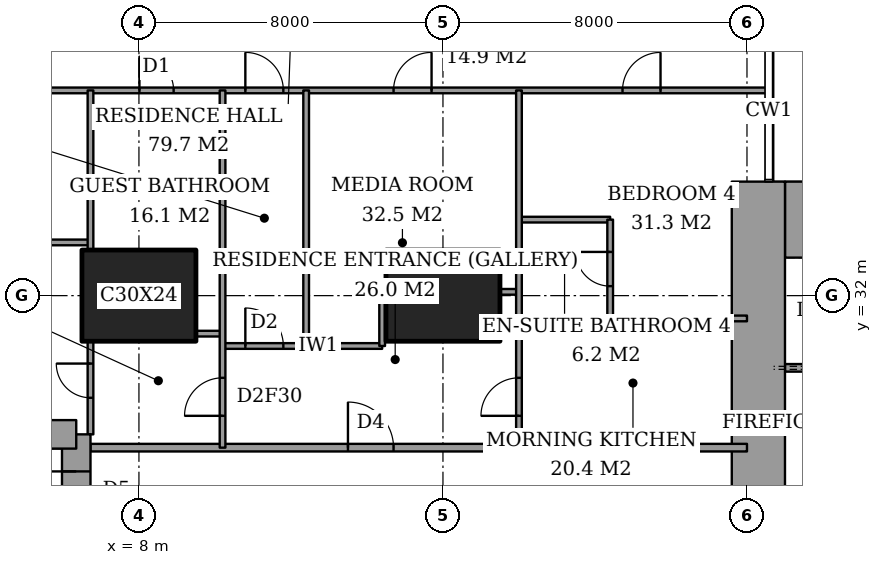
"""IFC4 building model, lengths in metres.
Left out: names, types, materials, properties, quantities, classifications, styles, units other than length and angle.
Written with IfcOpenShell. Run it as: python <this file> out.ifc"""

import sys

from ifc_helpers import new_model, si_unit, direction, frame, frame_2d, origin, origin_2d, place, context, subcontext, project, spatial, rectangle, extrude, element, fill, save


model = new_model("IFC4")
c1 = context("Model", 3, precision=1e-05, world=origin(), true_north=direction((0.0, 1.0)))
c2 = subcontext(c1, "Body", "Model", "MODEL_VIEW")
j1 = project(units=[si_unit("LENGTHUNIT", "METRE"), si_unit("PLANEANGLEUNIT", "RADIAN")], contexts=[c1])
p1 = place(None, origin())
s1 = spatial("IfcSite", under=j1, at=p1, CompositionType="ELEMENT")
p2 = place(p1, origin())
s2 = spatial("IfcBuilding", under=s1, at=p2, CompositionType="ELEMENT")
p3 = place(p2, frame((0.0, 0.0, 214.6)))
s3 = spatial("IfcBuildingStorey", under=s2, at=p3, CompositionType="ELEMENT", Elevation=214.6)
for number, where, z_axis, x_axis in (
    (1, (8.0, 32.0, 0.0), (0.0, 0.0, 1.0), (1.0, 0.0, 0.0)),
    (2, (16.0, 32.0, 0.0), (0.0, 0.0, 1.0), (1.0, 0.0, 0.0)),
):
    element("IfcColumn", number, at=place(p3, frame(where, z_axis=z_axis, x_axis=x_axis)), inside=s3, PredefinedType="COLUMN", context=c2, shape_type="SweptSolid", body=[
        extrude(rectangle(XDim=3.0, YDim=2.4, at=origin_2d()), origin(), (0.0, 0.0, 1.0), 3.6),
    ])
p4 = place(p3, frame((25.0, 34.0, 0.0), z_axis=(0.0, 0.0, 1.0), x_axis=(1.0, 0.0, 0.0)))
e3 = element("IfcWall", 3, at=p4, inside=s3, PredefinedType="SHEAR", context=c2, shape_type="SweptSolid", body=[
    extrude(rectangle(XDim=3.15, YDim=2.0, at=frame_2d((1.575, 0.0))), origin(), (0.0, 0.0, 1.0), 3.6),
])
p5 = place(p3, frame((24.3, 23.15, 0.0), z_axis=(0.0, 0.0, 1.0), x_axis=(0.0, 1.0, 0.0)))
e4 = element("IfcWall", 4, at=p5, inside=s3, PredefinedType="SHEAR", context=c2, shape_type="SweptSolid", body=[
    extrude(rectangle(XDim=11.85, YDim=1.4, at=frame_2d((5.925, 0.0))), origin(), (0.0, 0.0, 1.0), 3.6),
])
p6 = place(p5, frame((0.75, 0.0, 0.0)))
e5 = element("IfcOpeningElement", 5, at=p6, cuts=e4, PredefinedType="OPENING", context=c2, shape_type="SweptSolid", body=[
    extrude(rectangle(XDim=1.8, YDim=2.4, at=frame_2d((0.9, 1.2))), frame((0.0, 0.71, 0.0), z_axis=(0.0, -1.0, 0.0), x_axis=(1.0, 0.0, 0.0)), (0.0, 0.0, 1.0), 1.42),
])
p7 = place(p3, frame((6.35, 19.65, 0.0), z_axis=(0.0, 0.0, 1.0), x_axis=(0.0, 1.0, 0.0)))
e6 = element("IfcWall", 6, at=p7, inside=s3, PredefinedType="SHEAR", context=c2, shape_type="SweptSolid", body=[
    extrude(rectangle(XDim=8.7, YDim=0.75, at=frame_2d((4.35, 0.0))), origin(), (0.0, 0.0, 1.0), 3.6),
])
p8 = place(p7, frame((6.725, 0.0, 0.0)))
e7 = element("IfcOpeningElement", 7, at=p8, cuts=e6, PredefinedType="OPENING", context=c2, shape_type="SweptSolid", body=[
    extrude(rectangle(XDim=1.0, YDim=2.1, at=frame_2d((0.5, 1.05))), frame((0.0, 0.385, 0.0), z_axis=(0.0, -1.0, 0.0), x_axis=(1.0, 0.0, 0.0)), (0.0, 0.0, 1.0), 0.77),
])
p9 = place(p3, frame((6.35, 28.35, 0.0), z_axis=(0.0, 0.0, 1.0), x_axis=(-1.0, 0.0, 0.0)))
e8 = element("IfcWall", 8, at=p9, inside=s3, PredefinedType="SHEAR", context=c2, shape_type="SweptSolid", body=[
    extrude(rectangle(XDim=4.45, YDim=0.75, at=frame_2d((2.225, 0.0))), origin(), (0.0, 0.0, 1.0), 3.6),
])
p10 = place(p3, frame((6.725, 28.0, 0.0), z_axis=(0.0, 0.0, 1.0), x_axis=(1.0, 0.0, 0.0)))
e9 = element("IfcWall", 9, at=p10, inside=s3, PredefinedType="PARTITIONING", context=c2, shape_type="SweptSolid", body=[
    extrude(rectangle(XDim=17.275, YDim=0.2, at=frame_2d((8.637, 0.0))), origin(), (0.0, 0.0, 1.0), 3.35),
])
p11 = place(p10, frame((6.775, 0.0, 0.0)))
e10 = element("IfcOpeningElement", 10, at=p11, cuts=e9, PredefinedType="OPENING", context=c2, shape_type="SweptSolid", body=[
    extrude(rectangle(XDim=1.2, YDim=2.4, at=frame_2d((0.6, 1.2))), frame((0.0, 0.11, 0.0), z_axis=(0.0, -1.0, 0.0), x_axis=(1.0, 0.0, 0.0)), (0.0, 0.0, 1.0), 0.22),
])
p12 = place(p3, frame((10.2, 30.675, 0.0), z_axis=(0.0, 0.0, 1.0), x_axis=(1.0, 0.0, 0.0)))
e11 = element("IfcWall", 11, at=p12, inside=s3, PredefinedType="PARTITIONING", context=c2, shape_type="SweptSolid", body=[
    extrude(rectangle(XDim=4.2, YDim=0.15, at=frame_2d((2.1, 0.0))), origin(), (0.0, 0.0, 1.0), 3.35),
])
p13 = place(p12, frame((0.6, 0.0, 0.0)))
e12 = element("IfcOpeningElement", 12, at=p13, cuts=e11, PredefinedType="OPENING", context=c2, shape_type="SweptSolid", body=[
    extrude(rectangle(XDim=1.0, YDim=2.1, at=frame_2d((0.5, 1.05))), frame((0.0, 0.085, 0.0), z_axis=(0.0, -1.0, 0.0), x_axis=(1.0, 0.0, 0.0)), (0.0, 0.0, 1.0), 0.17),
])
p14 = place(p3, frame((9.5, 31.0, 0.0), z_axis=(0.0, 0.0, 1.0), x_axis=(1.0, 0.0, 0.0)))
e13 = element("IfcWall", 13, at=p14, inside=s3, PredefinedType="PARTITIONING", context=c2, shape_type="SweptSolid", body=[
    extrude(rectangle(XDim=0.7, YDim=0.15, at=frame_2d((0.35, 0.0))), origin(), (0.0, 0.0, 1.0), 3.35),
])
p15 = place(p3, frame((18.0, 31.4, 0.0), z_axis=(0.0, 0.0, 1.0), x_axis=(1.0, 0.0, 0.0)))
e14 = element("IfcWall", 14, at=p15, inside=s3, PredefinedType="PARTITIONING", context=c2, shape_type="SweptSolid", body=[
    extrude(rectangle(XDim=6.0, YDim=0.15, at=frame_2d((3.0, 0.0))), origin(), (0.0, 0.0, 1.0), 3.35),
])
p16 = place(p3, frame((17.5, 32.1, 0.0), z_axis=(0.0, 0.0, 1.0), x_axis=(1.0, 0.0, 0.0)))
e15 = element("IfcWall", 15, at=p16, inside=s3, PredefinedType="PARTITIONING", context=c2, shape_type="SweptSolid", body=[
    extrude(rectangle(XDim=0.5, YDim=0.15, at=frame_2d((0.25, 0.0))), origin(), (0.0, 0.0, 1.0), 2.634),
])
p17 = place(p3, frame((-0.45, 33.4, 0.0), z_axis=(0.0, 0.0, 1.0), x_axis=(1.0, 0.0, 0.0)))
e16 = element("IfcWall", 16, at=p17, inside=s3, PredefinedType="PARTITIONING", context=c2, shape_type="SweptSolid", body=[
    extrude(rectangle(XDim=7.175, YDim=0.15, at=frame_2d((3.587, 0.0))), origin(), (0.0, 0.0, 1.0), 3.35),
])
p18 = place(p3, frame((18.0, 34.0, 0.0), z_axis=(0.0, 0.0, 1.0), x_axis=(1.0, 0.0, 0.0)))
e17 = element("IfcWall", 17, at=p18, inside=s3, PredefinedType="PARTITIONING", context=c2, shape_type="SweptSolid", body=[
    extrude(rectangle(XDim=2.4, YDim=0.15, at=frame_2d((1.2, 0.0))), origin(), (0.0, 0.0, 1.0), 3.35),
])
p19 = place(p3, frame((-0.45, 37.4, 0.0), z_axis=(0.0, 0.0, 1.0), x_axis=(1.0, 0.0, 0.0)))
e18 = element("IfcWall", 18, at=p19, inside=s3, PredefinedType="PARTITIONING", context=c2, shape_type="SweptSolid", body=[
    extrude(rectangle(XDim=25.011, YDim=0.15, at=frame_2d((12.505, 0.0))), origin(), (0.0, 0.0, 1.0), 3.35),
])
p20 = place(p19, frame((11.25, 0.0, 0.0)))
e19 = element("IfcOpeningElement", 19, at=p20, cuts=e18, PredefinedType="OPENING", context=c2, shape_type="SweptSolid", body=[
    extrude(rectangle(XDim=1.0, YDim=2.1, at=frame_2d((0.5, 1.05))), frame((0.0, 0.085, 0.0), z_axis=(0.0, -1.0, 0.0), x_axis=(1.0, 0.0, 0.0)), (0.0, 0.0, 1.0), 0.17),
])
p21 = place(p19, frame((3.087, 0.0, 0.0)))
e20 = element("IfcOpeningElement", 20, at=p21, cuts=e18, PredefinedType="OPENING", context=c2, shape_type="SweptSolid", body=[
    extrude(rectangle(XDim=1.0, YDim=2.1, at=frame_2d((0.5, 1.05))), frame((0.0, 0.085, 0.0), z_axis=(0.0, -1.0, 0.0), x_axis=(1.0, 0.0, 0.0)), (0.0, 0.0, 1.0), 0.17),
])
p22 = place(p19, frame((8.462, 0.0, 0.0)))
e21 = element("IfcOpeningElement", 21, at=p22, cuts=e18, PredefinedType="OPENING", context=c2, shape_type="SweptSolid", body=[
    extrude(rectangle(XDim=0.9, YDim=2.1, at=frame_2d((0.45, 1.05))), frame((0.0, 0.085, 0.0), z_axis=(0.0, -1.0, 0.0), x_axis=(1.0, 0.0, 0.0)), (0.0, 0.0, 1.0), 0.17),
])
p23 = place(p19, frame((15.15, 0.0, 0.0)))
e22 = element("IfcOpeningElement", 22, at=p23, cuts=e18, PredefinedType="OPENING", context=c2, shape_type="SweptSolid", body=[
    extrude(rectangle(XDim=1.0, YDim=2.1, at=frame_2d((0.5, 1.05))), frame((0.0, 0.085, 0.0), z_axis=(0.0, -1.0, 0.0), x_axis=(1.0, 0.0, 0.0)), (0.0, 0.0, 1.0), 0.17),
])
p24 = place(p19, frame((21.175, 0.0, 0.0)))
e23 = element("IfcOpeningElement", 23, at=p24, cuts=e18, PredefinedType="OPENING", context=c2, shape_type="SweptSolid", body=[
    extrude(rectangle(XDim=1.0, YDim=2.1, at=frame_2d((0.5, 1.05))), frame((0.0, 0.085, 0.0), z_axis=(0.0, -1.0, 0.0), x_axis=(1.0, 0.0, 0.0)), (0.0, 0.0, 1.0), 0.17),
])
p25 = place(p3, frame((6.725, 28.35, 0.0), z_axis=(0.0, 0.0, 1.0), x_axis=(0.0, 1.0, 0.0)))
e24 = element("IfcWall", 24, at=p25, inside=s3, PredefinedType="PARTITIONING", context=c2, shape_type="SweptSolid", body=[
    extrude(rectangle(XDim=2.45, YDim=0.15, at=frame_2d((1.225, 0.0))), origin(), (0.0, 0.0, 1.0), 3.35),
])
p26 = place(p25, frame((0.962, 0.0, 0.0)))
e25 = element("IfcOpeningElement", 25, at=p26, cuts=e24, PredefinedType="OPENING", context=c2, shape_type="SweptSolid", body=[
    extrude(rectangle(XDim=0.9, YDim=2.1, at=frame_2d((0.45, 1.05))), frame((0.0, 0.085, 0.0), z_axis=(0.0, -1.0, 0.0), x_axis=(1.0, 0.0, 0.0)), (0.0, 0.0, 1.0), 0.17),
])
p27 = place(p3, frame((6.725, 33.2, 0.0), z_axis=(0.0, 0.0, 1.0), x_axis=(0.0, 1.0, 0.0)))
e26 = element("IfcWall", 26, at=p27, inside=s3, PredefinedType="PARTITIONING", context=c2, shape_type="SweptSolid", body=[
    extrude(rectangle(XDim=4.2, YDim=0.15, at=frame_2d((2.1, 0.0))), origin(), (0.0, 0.0, 1.0), 3.35),
])
p28 = place(p3, frame((10.2, 28.0, 0.0), z_axis=(0.0, 0.0, 1.0), x_axis=(0.0, 1.0, 0.0)))
e27 = element("IfcWall", 27, at=p28, inside=s3, PredefinedType="PARTITIONING", context=c2, shape_type="SweptSolid", body=[
    extrude(rectangle(XDim=9.4, YDim=0.15, at=frame_2d((4.7, 0.0))), origin(), (0.0, 0.0, 1.0), 3.35),
])
p29 = place(p28, frame((0.837, 0.0, 0.0)))
e28 = element("IfcOpeningElement", 28, at=p29, cuts=e27, PredefinedType="OPENING", context=c2, shape_type="SweptSolid", body=[
    extrude(rectangle(XDim=1.0, YDim=2.1, at=frame_2d((0.5, 1.05))), frame((0.0, 0.085, 0.0), z_axis=(0.0, -1.0, 0.0), x_axis=(1.0, 0.0, 0.0)), (0.0, 0.0, 1.0), 0.17),
])
p30 = place(p3, frame((12.4, 30.675, 0.0), z_axis=(0.0, 0.0, 1.0), x_axis=(0.0, 1.0, 0.0)))
e29 = element("IfcWall", 29, at=p30, inside=s3, PredefinedType="PARTITIONING", context=c2, shape_type="SweptSolid", body=[
    extrude(rectangle(XDim=6.725, YDim=0.15, at=frame_2d((3.362, 0.0))), origin(), (0.0, 0.0, 1.0), 3.35),
])
p31 = place(p3, frame((14.4, 30.675, 0.0), z_axis=(0.0, 0.0, 1.0), x_axis=(0.0, 1.0, 0.0)))
e30 = element("IfcWall", 30, at=p31, inside=s3, PredefinedType="PARTITIONING", context=c2, shape_type="SweptSolid", body=[
    extrude(rectangle(XDim=1.425, YDim=0.15, at=frame_2d((0.712, 0.0))), origin(), (0.0, 0.0, 1.0), 3.35),
])
p32 = place(p3, frame((18.0, 28.0, 0.0), z_axis=(0.0, 0.0, 1.0), x_axis=(0.0, 1.0, 0.0)))
e31 = element("IfcWall", 31, at=p32, inside=s3, PredefinedType="PARTITIONING", context=c2, shape_type="SweptSolid", body=[
    extrude(rectangle(XDim=9.4, YDim=0.15, at=frame_2d((4.7, 0.0))), origin(), (0.0, 0.0, 1.0), 3.35),
])
p33 = place(p32, frame((0.837, 0.0, 0.0)))
e32 = element("IfcOpeningElement", 32, at=p33, cuts=e31, PredefinedType="OPENING", context=c2, shape_type="SweptSolid", body=[
    extrude(rectangle(XDim=1.0, YDim=2.1, at=frame_2d((0.5, 1.05))), frame((0.0, 0.085, 0.0), z_axis=(0.0, -1.0, 0.0), x_axis=(1.0, 0.0, 0.0)), (0.0, 0.0, 1.0), 0.17),
])
p34 = place(p3, frame((20.4, 31.4, 0.0), z_axis=(0.0, 0.0, 1.0), x_axis=(0.0, 1.0, 0.0)))
e33 = element("IfcWall", 33, at=p34, inside=s3, PredefinedType="PARTITIONING", context=c2, shape_type="SweptSolid", body=[
    extrude(rectangle(XDim=2.6, YDim=0.15, at=frame_2d((1.3, 0.0))), origin(), (0.0, 0.0, 1.0), 3.35),
])
p35 = place(p34, frame((0.85, 0.0, 0.0)))
e34 = element("IfcOpeningElement", 34, at=p35, cuts=e33, PredefinedType="OPENING", context=c2, shape_type="SweptSolid", body=[
    extrude(rectangle(XDim=0.9, YDim=2.1, at=frame_2d((0.45, 1.05))), frame((0.0, 0.085, 0.0), z_axis=(0.0, -1.0, 0.0), x_axis=(1.0, 0.0, 0.0)), (0.0, 0.0, 1.0), 0.17),
])
p36 = place(p3, frame((25.0, 30.1, 0.0), z_axis=(0.0, 0.0, 1.0), x_axis=(1.0, 0.0, 0.0)))
e35 = element("IfcWall", 35, at=p36, inside=s3, PredefinedType="PARTITIONING", context=c2, shape_type="SweptSolid", body=[
    extrude(rectangle(XDim=12.7, YDim=0.2, at=frame_2d((6.35, 0.0))), origin(), (0.0, 0.0, 1.0), 3.6),
])
p37 = place(p36, frame((4.25, 0.0, 0.0)))
e36 = element("IfcOpeningElement", 36, at=p37, cuts=e35, PredefinedType="OPENING", context=c2, shape_type="SweptSolid", body=[
    extrude(rectangle(XDim=1.1, YDim=2.1, at=frame_2d((0.55, 1.05))), frame((0.0, 0.11, 0.0), z_axis=(0.0, -1.0, 0.0), x_axis=(1.0, 0.0, 0.0)), (0.0, 0.0, 1.0), 0.22),
])
p38 = place(p36, frame((7.45, 0.0, 0.0)))
e37 = element("IfcOpeningElement", 37, at=p38, cuts=e35, PredefinedType="OPENING", context=c2, shape_type="SweptSolid", body=[
    extrude(rectangle(XDim=1.1, YDim=2.1, at=frame_2d((0.55, 1.05))), frame((0.0, 0.11, 0.0), z_axis=(0.0, -1.0, 0.0), x_axis=(1.0, 0.0, 0.0)), (0.0, 0.0, 1.0), 0.22),
])
p39 = place(p36, frame((10.65, 0.0, 0.0)))
e38 = element("IfcOpeningElement", 38, at=p39, cuts=e35, PredefinedType="OPENING", context=c2, shape_type="SweptSolid", body=[
    extrude(rectangle(XDim=1.1, YDim=2.1, at=frame_2d((0.55, 1.05))), frame((0.0, 0.11, 0.0), z_axis=(0.0, -1.0, 0.0), x_axis=(1.0, 0.0, 0.0)), (0.0, 0.0, 1.0), 0.22),
])
p40 = place(p36, frame((0.9, 0.0, 0.0)))
e39 = element("IfcOpeningElement", 39, at=p40, cuts=e35, PredefinedType="OPENING", context=c2, shape_type="SweptSolid", body=[
    extrude(rectangle(XDim=1.2, YDim=2.1, at=frame_2d((0.6, 1.05))), frame((0.0, 0.11, 0.0), z_axis=(0.0, -1.0, 0.0), x_axis=(1.0, 0.0, 0.0)), (0.0, 0.0, 1.0), 0.22),
])
p41 = place(p20, origin())
e40 = element("IfcDoor", 40, at=p41, inside=s3, OperationType="SINGLE_SWING_RIGHT", PredefinedType="DOOR", context=c2, shape_type="SweptSolid", body=[
    extrude(rectangle(XDim=1.0, YDim=2.1, at=frame_2d((0.5, 1.05))), frame((0.0, 0.025, 0.0), z_axis=(0.0, -1.0, 0.0), x_axis=(1.0, 0.0, 0.0)), (0.0, 0.0, 1.0), 0.05),
])
fill(e19, e40)
p42 = place(p26, origin())
e41 = element("IfcDoor", 41, at=p42, inside=s3, OperationType="SINGLE_SWING_LEFT", PredefinedType="DOOR", context=c2, shape_type="SweptSolid", body=[
    extrude(rectangle(XDim=0.9, YDim=2.1, at=frame_2d((0.45, 1.05))), frame((0.0, 0.025, 0.0), z_axis=(0.0, -1.0, 0.0), x_axis=(1.0, 0.0, 0.0)), (0.0, 0.0, 1.0), 0.05),
])
fill(e25, e41)
p43 = place(p22, origin())
e42 = element("IfcDoor", 42, at=p43, inside=s3, OperationType="SINGLE_SWING_RIGHT", PredefinedType="DOOR", context=c2, shape_type="SweptSolid", body=[
    extrude(rectangle(XDim=0.9, YDim=2.1, at=frame_2d((0.45, 1.05))), frame((0.0, 0.025, 0.0), z_axis=(0.0, -1.0, 0.0), x_axis=(1.0, 0.0, 0.0)), (0.0, 0.0, 1.0), 0.05),
])
fill(e21, e42)
p44 = place(p29, origin())
e43 = element("IfcDoor", 43, at=p44, inside=s3, OperationType="SINGLE_SWING_RIGHT", PredefinedType="DOOR", context=c2, shape_type="SweptSolid", body=[
    extrude(rectangle(XDim=1.0, YDim=2.1, at=frame_2d((0.5, 1.05))), frame((0.0, 0.025, 0.0), z_axis=(0.0, -1.0, 0.0), x_axis=(1.0, 0.0, 0.0)), (0.0, 0.0, 1.0), 0.05),
])
fill(e28, e43)
p45 = place(p11, origin())
e44 = element("IfcDoor", 44, at=p45, inside=s3, OperationType="SINGLE_SWING_RIGHT", PredefinedType="DOOR", context=c2, shape_type="SweptSolid", body=[
    extrude(rectangle(XDim=1.2, YDim=2.4, at=frame_2d((0.6, 1.2))), frame((0.0, 0.025, 0.0), z_axis=(0.0, -1.0, 0.0), x_axis=(1.0, 0.0, 0.0)), (0.0, 0.0, 1.0), 0.05),
])
fill(e10, e44)
p46 = place(p13, origin())
e45 = element("IfcDoor", 45, at=p46, inside=s3, OperationType="SINGLE_SWING_RIGHT", PredefinedType="DOOR", context=c2, shape_type="SweptSolid", body=[
    extrude(rectangle(XDim=1.0, YDim=2.1, at=frame_2d((0.5, 1.05))), frame((0.0, 0.025, 0.0), z_axis=(0.0, -1.0, 0.0), x_axis=(1.0, 0.0, 0.0)), (0.0, 0.0, 1.0), 0.05),
])
fill(e12, e45)
p47 = place(p23, origin())
e46 = element("IfcDoor", 46, at=p47, inside=s3, OperationType="SINGLE_SWING_LEFT", PredefinedType="DOOR", context=c2, shape_type="SweptSolid", body=[
    extrude(rectangle(XDim=1.0, YDim=2.1, at=frame_2d((0.5, 1.05))), frame((0.0, 0.025, 0.0), z_axis=(0.0, -1.0, 0.0), x_axis=(1.0, 0.0, 0.0)), (0.0, 0.0, 1.0), 0.05),
])
fill(e22, e46)
p48 = place(p35, origin())
e47 = element("IfcDoor", 47, at=p48, inside=s3, OperationType="SINGLE_SWING_LEFT", PredefinedType="DOOR", context=c2, shape_type="SweptSolid", body=[
    extrude(rectangle(XDim=0.9, YDim=2.1, at=frame_2d((0.45, 1.05))), frame((0.0, 0.025, 0.0), z_axis=(0.0, -1.0, 0.0), x_axis=(1.0, 0.0, 0.0)), (0.0, 0.0, 1.0), 0.05),
])
fill(e34, e47)
p49 = place(p24, origin())
e48 = element("IfcDoor", 48, at=p49, inside=s3, OperationType="SINGLE_SWING_LEFT", PredefinedType="DOOR", context=c2, shape_type="SweptSolid", body=[
    extrude(rectangle(XDim=1.0, YDim=2.1, at=frame_2d((0.5, 1.05))), frame((0.0, 0.025, 0.0), z_axis=(0.0, -1.0, 0.0), x_axis=(1.0, 0.0, 0.0)), (0.0, 0.0, 1.0), 0.05),
])
fill(e23, e48)
p50 = place(p33, origin())
e49 = element("IfcDoor", 49, at=p50, inside=s3, OperationType="SINGLE_SWING_RIGHT", PredefinedType="DOOR", context=c2, shape_type="SweptSolid", body=[
    extrude(rectangle(XDim=1.0, YDim=2.1, at=frame_2d((0.5, 1.05))), frame((0.0, 0.025, 0.0), z_axis=(0.0, -1.0, 0.0), x_axis=(1.0, 0.0, 0.0)), (0.0, 0.0, 1.0), 0.05),
])
fill(e32, e49)
p51 = place(p8, origin())
e50 = element("IfcDoor", 50, at=p51, inside=s3, OperationType="SINGLE_SWING_LEFT", PredefinedType="DOOR", context=c2, shape_type="SweptSolid", body=[
    extrude(rectangle(XDim=1.0, YDim=2.1, at=frame_2d((0.5, 1.05))), frame((0.0, 0.025, 0.0), z_axis=(0.0, -1.0, 0.0), x_axis=(1.0, 0.0, 0.0)), (0.0, 0.0, 1.0), 0.05),
])
fill(e7, e50)
save(model, sys.argv[1])
